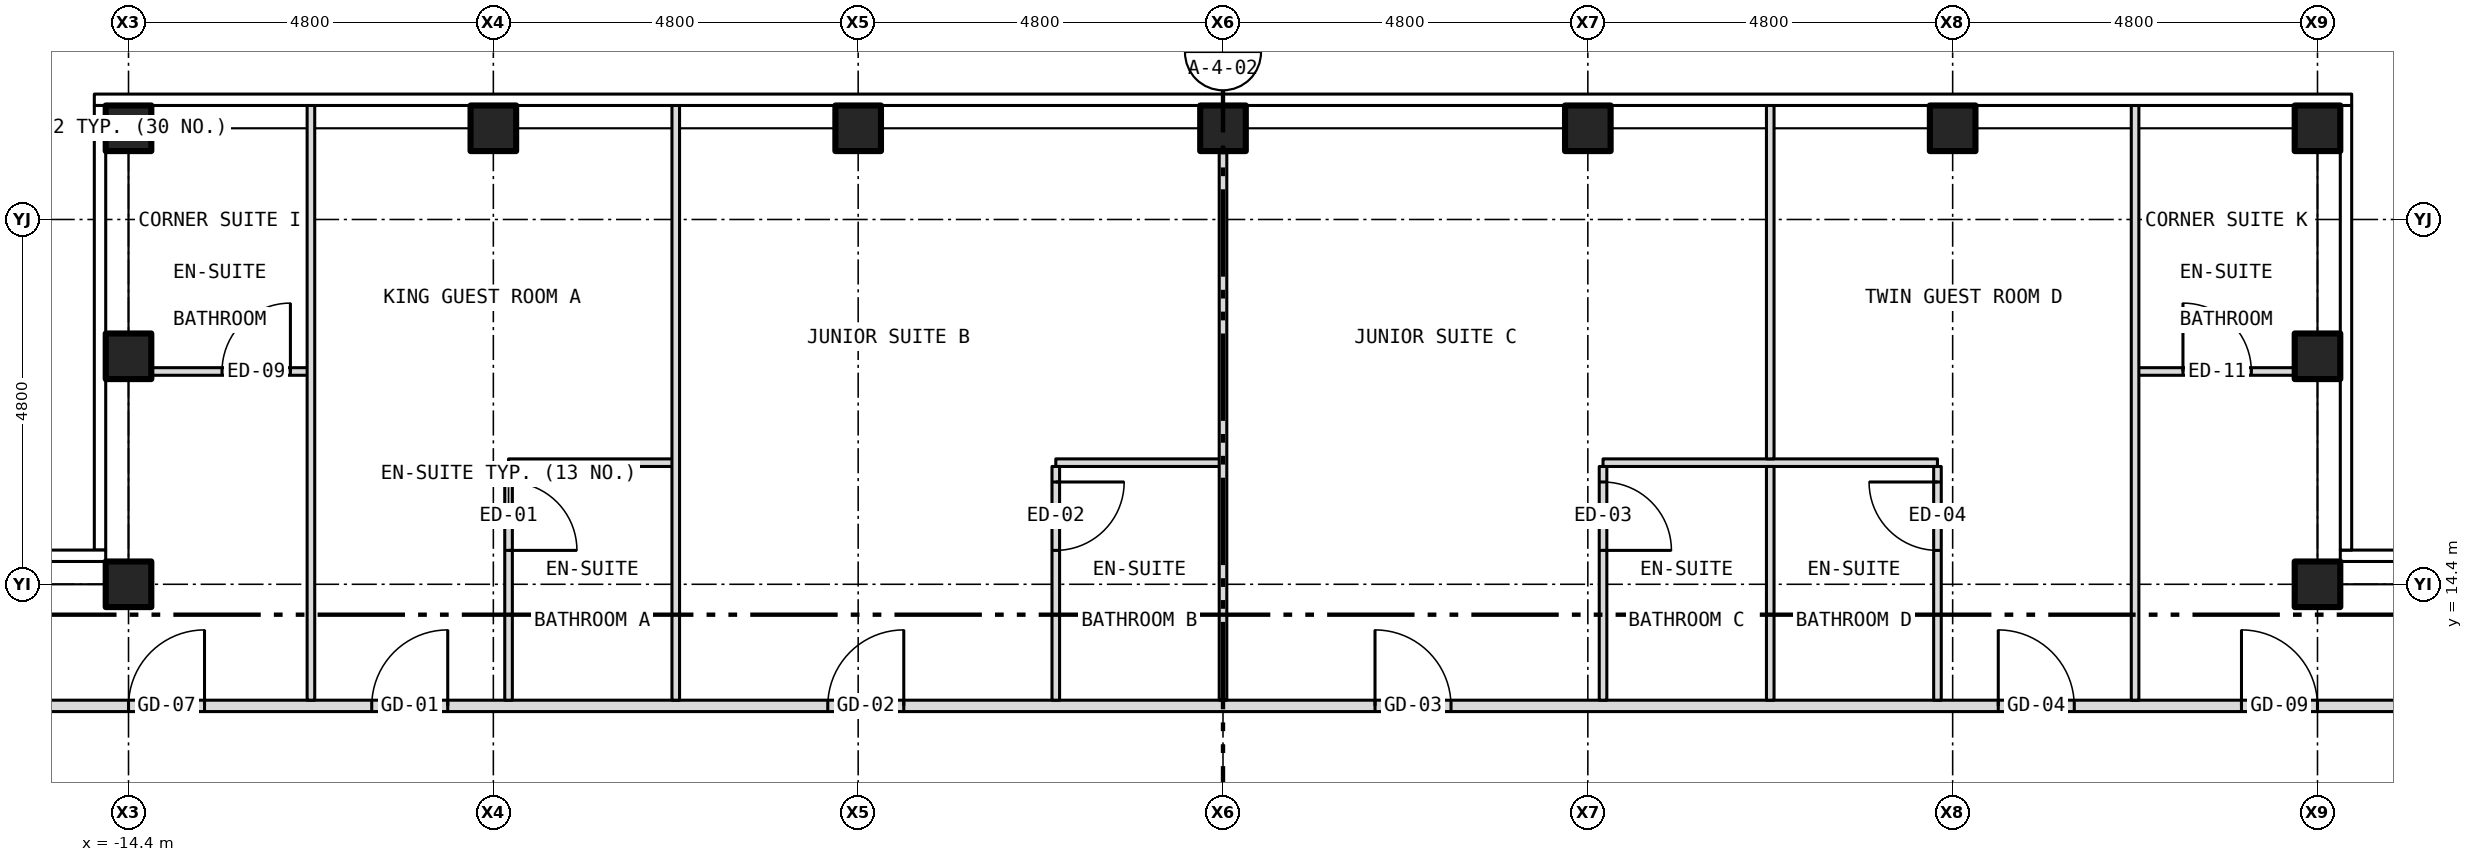
"""IFC4 building model, lengths in metres.
Left out: names, types, materials, properties, quantities, classifications, styles, units other than length and angle.
Written with IfcOpenShell. Run it as: python <this file> out.ifc"""

import sys

from ifc_helpers import new_model, si_unit, direction, frame, frame_2d, origin, origin_2d, place, context, subcontext, project, spatial, rectangle, hollow_rectangle, extrude, element, fill, save


model = new_model("IFC4")
c1 = context("Model", 3, precision=1e-05, world=origin(), true_north=direction((0.0, 1.0)))
c2 = subcontext(c1, "Body", "Model", "MODEL_VIEW")
j1 = project(units=[si_unit("LENGTHUNIT", "METRE"), si_unit("PLANEANGLEUNIT", "RADIAN")], contexts=[c1])
p1 = place(None, origin())
s1 = spatial("IfcSite", under=j1, at=p1, CompositionType="ELEMENT")
p2 = place(p1, origin())
s2 = spatial("IfcBuilding", under=s1, at=p2, CompositionType="ELEMENT")
p3 = place(p2, frame((0.0, 0.0, 262.0)))
s3 = spatial("IfcBuildingStorey", under=s2, at=p3, CompositionType="ELEMENT", Elevation=262.0)
for number, where, z_axis, x_axis in (
    (1, (-14.4, 20.4, -0.15), (0.0, 0.0, 1.0), (1.0, 0.0, 0.0)),
    (2, (-9.6, 20.4, -0.15), (0.0, 0.0, 1.0), (1.0, 0.0, 0.0)),
    (3, (-4.8, 20.4, -0.15), (0.0, 0.0, 1.0), (1.0, 0.0, 0.0)),
    (4, (0.0, 20.4, -0.15), (0.0, 0.0, 1.0), (1.0, 0.0, 0.0)),
    (5, (4.8, 20.4, -0.15), (0.0, 0.0, 1.0), (1.0, 0.0, 0.0)),
    (6, (9.6, 20.4, -0.15), (0.0, 0.0, 1.0), (1.0, 0.0, 0.0)),
    (7, (14.4, 20.4, -0.15), (0.0, 0.0, 1.0), (1.0, 0.0, 0.0)),
    (8, (-14.4, 14.4, -0.15), (0.0, 0.0, 1.0), (1.0, 0.0, 0.0)),
    (9, (-14.4, 17.4, -0.15), (0.0, 0.0, 1.0), (1.0, 0.0, 0.0)),
    (10, (14.4, 14.4, -0.15), (0.0, 0.0, 1.0), (1.0, 0.0, 0.0)),
    (11, (14.4, 17.4, -0.15), (0.0, 0.0, 1.0), (1.0, 0.0, 0.0)),
):
    element("IfcColumn", number, at=place(p3, frame(where, z_axis=z_axis, x_axis=x_axis)), inside=s3, PredefinedType="COLUMN", context=c2, shape_type="SweptSolid", body=[
        extrude(hollow_rectangle(XDim=0.6, YDim=0.6, WallThickness=0.03, at=origin_2d()), origin(), (0.0, 0.0, 1.0), 3.4),
    ])
p4 = place(p3, frame((-15.8, 12.8, 0.0), z_axis=(0.0, 0.0, 1.0), x_axis=(1.0, 0.0, 0.0)))
e12 = element("IfcWall", 12, at=p4, inside=s3, PredefinedType="PARTITIONING", context=c2, shape_type="SweptSolid", body=[
    extrude(rectangle(XDim=31.6, YDim=0.15, at=frame_2d((15.8, 0.0))), origin(), (0.0, 0.0, 1.0), 3.25),
])
p5 = place(p4, frame((4.6, 0.0, 0.0)))
e13 = element("IfcOpeningElement", 13, at=p5, cuts=e12, PredefinedType="OPENING", context=c2, shape_type="SweptSolid", body=[
    extrude(rectangle(XDim=1.0, YDim=2.1, at=frame_2d((0.5, 1.05))), frame((0.0, 0.087, 0.0), z_axis=(0.0, -1.0, 0.0), x_axis=(1.0, 0.0, 0.0)), (0.0, 0.0, 1.0), 0.174),
])
p6 = place(p4, frame((10.6, 0.0, 0.0)))
e14 = element("IfcOpeningElement", 14, at=p6, cuts=e12, PredefinedType="OPENING", context=c2, shape_type="SweptSolid", body=[
    extrude(rectangle(XDim=1.0, YDim=2.1, at=frame_2d((0.5, 1.05))), frame((0.0, 0.087, 0.0), z_axis=(0.0, -1.0, 0.0), x_axis=(1.0, 0.0, 0.0)), (0.0, 0.0, 1.0), 0.174),
])
p7 = place(p4, frame((17.8, 0.0, 0.0)))
e15 = element("IfcOpeningElement", 15, at=p7, cuts=e12, PredefinedType="OPENING", context=c2, shape_type="SweptSolid", body=[
    extrude(rectangle(XDim=1.0, YDim=2.1, at=frame_2d((0.5, 1.05))), frame((0.0, 0.087, 0.0), z_axis=(0.0, -1.0, 0.0), x_axis=(1.0, 0.0, 0.0)), (0.0, 0.0, 1.0), 0.174),
])
p8 = place(p4, frame((26.0, 0.0, 0.0)))
e16 = element("IfcOpeningElement", 16, at=p8, cuts=e12, PredefinedType="OPENING", context=c2, shape_type="SweptSolid", body=[
    extrude(rectangle(XDim=1.0, YDim=2.1, at=frame_2d((0.5, 1.05))), frame((0.0, 0.087, 0.0), z_axis=(0.0, -1.0, 0.0), x_axis=(1.0, 0.0, 0.0)), (0.0, 0.0, 1.0), 0.174),
])
p9 = place(p4, frame((1.4, 0.0, 0.0)))
e17 = element("IfcOpeningElement", 17, at=p9, cuts=e12, PredefinedType="OPENING", context=c2, shape_type="SweptSolid", body=[
    extrude(rectangle(XDim=1.0, YDim=2.1, at=frame_2d((0.5, 1.05))), frame((0.0, 0.087, 0.0), z_axis=(0.0, -1.0, 0.0), x_axis=(1.0, 0.0, 0.0)), (0.0, 0.0, 1.0), 0.174),
])
p10 = place(p4, frame((29.2, 0.0, 0.0)))
e18 = element("IfcOpeningElement", 18, at=p10, cuts=e12, PredefinedType="OPENING", context=c2, shape_type="SweptSolid", body=[
    extrude(rectangle(XDim=1.0, YDim=2.1, at=frame_2d((0.5, 1.05))), frame((0.0, 0.087, 0.0), z_axis=(0.0, -1.0, 0.0), x_axis=(1.0, 0.0, 0.0)), (0.0, 0.0, 1.0), 0.174),
])
for number, where, z_axis, x_axis in (
    (19, (-9.4, 16.0, 0.0), (0.0, 0.0, 1.0), (1.0, 0.0, 0.0)),
    (20, (-2.2, 16.0, 0.0), (0.0, 0.0, 1.0), (1.0, 0.0, 0.0)),
):
    element("IfcWall", number, at=place(p3, frame(where, z_axis=z_axis, x_axis=x_axis)), inside=s3, PredefinedType="PARTITIONING", context=c2, shape_type="SweptSolid", body=[
        extrude(rectangle(XDim=2.2, YDim=0.1, at=frame_2d((1.1, 0.0))), origin(), (0.0, 0.0, 1.0), 3.25),
    ])
p11 = place(p3, frame((5.0, 16.0, 0.0), z_axis=(0.0, 0.0, 1.0), x_axis=(1.0, 0.0, 0.0)))
e21 = element("IfcWall", 21, at=p11, inside=s3, PredefinedType="PARTITIONING", context=c2, shape_type="SweptSolid", body=[
    extrude(rectangle(XDim=4.4, YDim=0.1, at=frame_2d((2.2, 0.0))), origin(), (0.0, 0.0, 1.0), 3.25),
])
p12 = place(p3, frame((-14.28, 17.2, 0.0), z_axis=(0.0, 0.0, 1.0), x_axis=(1.0, 0.0, 0.0)))
e22 = element("IfcWall", 22, at=p12, inside=s3, PredefinedType="PARTITIONING", context=c2, shape_type="SweptSolid", body=[
    extrude(rectangle(XDim=2.28, YDim=0.1, at=frame_2d((1.14, 0.0))), origin(), (0.0, 0.0, 1.0), 3.25),
])
p13 = place(p12, frame((1.11, 0.0, 0.0)))
e23 = element("IfcOpeningElement", 23, at=p13, cuts=e22, PredefinedType="OPENING", context=c2, shape_type="SweptSolid", body=[
    extrude(rectangle(XDim=0.9, YDim=2.1, at=frame_2d((0.45, 1.05))), frame((0.0, 0.062, 0.0), z_axis=(0.0, -1.0, 0.0), x_axis=(1.0, 0.0, 0.0)), (0.0, 0.0, 1.0), 0.124),
])
p14 = place(p3, frame((12.0, 17.2, 0.0), z_axis=(0.0, 0.0, 1.0), x_axis=(1.0, 0.0, 0.0)))
e24 = element("IfcWall", 24, at=p14, inside=s3, PredefinedType="PARTITIONING", context=c2, shape_type="SweptSolid", body=[
    extrude(rectangle(XDim=2.28, YDim=0.1, at=frame_2d((1.14, 0.0))), origin(), (0.0, 0.0, 1.0), 3.25),
])
p15 = place(p14, frame((0.63, 0.0, 0.0)))
e25 = element("IfcOpeningElement", 25, at=p15, cuts=e24, PredefinedType="OPENING", context=c2, shape_type="SweptSolid", body=[
    extrude(rectangle(XDim=0.9, YDim=2.1, at=frame_2d((0.45, 1.05))), frame((0.0, 0.062, 0.0), z_axis=(0.0, -1.0, 0.0), x_axis=(1.0, 0.0, 0.0)), (0.0, 0.0, 1.0), 0.124),
])
p16 = place(p3, frame((-12.0, 12.875, 0.0), z_axis=(0.0, 0.0, 1.0), x_axis=(0.0, 1.0, 0.0)))
e26 = element("IfcWall", 26, at=p16, inside=s3, PredefinedType="PARTITIONING", context=c2, shape_type="SweptSolid", body=[
    extrude(rectangle(XDim=7.855, YDim=0.1, at=frame_2d((3.927, 0.0))), origin(), (0.0, 0.0, 1.0), 3.25),
])
p17 = place(p3, frame((-9.4, 12.875, 0.0), z_axis=(0.0, 0.0, 1.0), x_axis=(0.0, 1.0, 0.0)))
e27 = element("IfcWall", 27, at=p17, inside=s3, PredefinedType="PARTITIONING", context=c2, shape_type="SweptSolid", body=[
    extrude(rectangle(XDim=3.075, YDim=0.1, at=frame_2d((1.538, 0.0))), origin(), (0.0, 0.0, 1.0), 2.628),
])
p18 = place(p17, frame((1.971, 0.0, 0.0)))
e28 = element("IfcOpeningElement", 28, at=p18, cuts=e27, PredefinedType="OPENING", context=c2, shape_type="SweptSolid", body=[
    extrude(rectangle(XDim=0.9, YDim=2.1, at=frame_2d((0.45, 1.05))), frame((0.0, 0.062, 0.0), z_axis=(0.0, -1.0, 0.0), x_axis=(1.0, 0.0, 0.0)), (0.0, 0.0, 1.0), 0.124),
])
p19 = place(p3, frame((-7.2, 12.875, 0.0), z_axis=(0.0, 0.0, 1.0), x_axis=(0.0, 1.0, 0.0)))
e29 = element("IfcWall", 29, at=p19, inside=s3, PredefinedType="PARTITIONING", context=c2, shape_type="SweptSolid", body=[
    extrude(rectangle(XDim=7.855, YDim=0.1, at=frame_2d((3.927, 0.0))), origin(), (0.0, 0.0, 1.0), 3.25),
])
p20 = place(p3, frame((-2.2, 12.875, 0.0), z_axis=(0.0, 0.0, 1.0), x_axis=(0.0, 1.0, 0.0)))
e30 = element("IfcWall", 30, at=p20, inside=s3, PredefinedType="PARTITIONING", context=c2, shape_type="SweptSolid", body=[
    extrude(rectangle(XDim=3.075, YDim=0.1, at=frame_2d((1.538, 0.0))), origin(), (0.0, 0.0, 1.0), 3.25),
])
p21 = place(p20, frame((1.971, 0.0, 0.0)))
e31 = element("IfcOpeningElement", 31, at=p21, cuts=e30, PredefinedType="OPENING", context=c2, shape_type="SweptSolid", body=[
    extrude(rectangle(XDim=0.9, YDim=2.1, at=frame_2d((0.45, 1.05))), frame((0.0, 0.062, 0.0), z_axis=(0.0, -1.0, 0.0), x_axis=(1.0, 0.0, 0.0)), (0.0, 0.0, 1.0), 0.124),
])
p22 = place(p3, frame((0.0, 12.875, 0.0), z_axis=(0.0, 0.0, 1.0), x_axis=(0.0, 1.0, 0.0)))
e32 = element("IfcWall", 32, at=p22, inside=s3, PredefinedType="PARTITIONING", context=c2, shape_type="SweptSolid", body=[
    extrude(rectangle(XDim=7.405, YDim=0.1, at=frame_2d((3.703, 0.0))), origin(), (0.0, 0.0, 1.0), 2.16),
])
p23 = place(p3, frame((5.0, 12.875, 0.0), z_axis=(0.0, 0.0, 1.0), x_axis=(0.0, 1.0, 0.0)))
e33 = element("IfcWall", 33, at=p23, inside=s3, PredefinedType="PARTITIONING", context=c2, shape_type="SweptSolid", body=[
    extrude(rectangle(XDim=3.075, YDim=0.1, at=frame_2d((1.538, 0.0))), origin(), (0.0, 0.0, 1.0), 3.25),
])
p24 = place(p23, frame((1.971, 0.0, 0.0)))
e34 = element("IfcOpeningElement", 34, at=p24, cuts=e33, PredefinedType="OPENING", context=c2, shape_type="SweptSolid", body=[
    extrude(rectangle(XDim=0.9, YDim=2.1, at=frame_2d((0.45, 1.05))), frame((0.0, 0.062, 0.0), z_axis=(0.0, -1.0, 0.0), x_axis=(1.0, 0.0, 0.0)), (0.0, 0.0, 1.0), 0.124),
])
p25 = place(p3, frame((7.2, 12.875, 0.0), z_axis=(0.0, 0.0, 1.0), x_axis=(0.0, 1.0, 0.0)))
e35 = element("IfcWall", 35, at=p25, inside=s3, PredefinedType="PARTITIONING", context=c2, shape_type="SweptSolid", body=[
    extrude(rectangle(XDim=3.075, YDim=0.1, at=frame_2d((1.538, 0.0))), origin(), (0.0, 0.0, 1.0), 3.25),
])
p26 = place(p3, frame((7.2, 16.05, 0.0), z_axis=(0.0, 0.0, 1.0), x_axis=(0.0, 1.0, 0.0)))
e36 = element("IfcWall", 36, at=p26, inside=s3, PredefinedType="PARTITIONING", context=c2, shape_type="SweptSolid", body=[
    extrude(rectangle(XDim=4.68, YDim=0.1, at=frame_2d((2.34, 0.0))), origin(), (0.0, 0.0, 1.0), 3.25),
])
p27 = place(p3, frame((9.4, 12.875, 0.0), z_axis=(0.0, 0.0, 1.0), x_axis=(0.0, 1.0, 0.0)))
e37 = element("IfcWall", 37, at=p27, inside=s3, PredefinedType="PARTITIONING", context=c2, shape_type="SweptSolid", body=[
    extrude(rectangle(XDim=3.075, YDim=0.1, at=frame_2d((1.538, 0.0))), origin(), (0.0, 0.0, 1.0), 2.628),
])
p28 = place(p27, frame((1.971, 0.0, 0.0)))
e38 = element("IfcOpeningElement", 38, at=p28, cuts=e37, PredefinedType="OPENING", context=c2, shape_type="SweptSolid", body=[
    extrude(rectangle(XDim=0.9, YDim=2.1, at=frame_2d((0.45, 1.05))), frame((0.0, 0.062, 0.0), z_axis=(0.0, -1.0, 0.0), x_axis=(1.0, 0.0, 0.0)), (0.0, 0.0, 1.0), 0.124),
])
p29 = place(p3, frame((12.0, 12.875, 0.0), z_axis=(0.0, 0.0, 1.0), x_axis=(0.0, 1.0, 0.0)))
e39 = element("IfcWall", 39, at=p29, inside=s3, PredefinedType="PARTITIONING", context=c2, shape_type="SweptSolid", body=[
    extrude(rectangle(XDim=7.855, YDim=0.1, at=frame_2d((3.927, 0.0))), origin(), (0.0, 0.0, 1.0), 3.25),
])
p30 = place(p5, origin())
e40 = element("IfcDoor", 40, at=p30, inside=s3, OperationType="SINGLE_SWING_RIGHT", PredefinedType="DOOR", context=c2, shape_type="SweptSolid", body=[
    extrude(rectangle(XDim=1.0, YDim=2.1, at=frame_2d((0.5, 1.05))), frame((0.0, 0.025, 0.0), z_axis=(0.0, -1.0, 0.0), x_axis=(1.0, 0.0, 0.0)), (0.0, 0.0, 1.0), 0.05),
])
fill(e13, e40)
p31 = place(p18, origin())
e41 = element("IfcDoor", 41, at=p31, inside=s3, OperationType="SINGLE_SWING_LEFT", PredefinedType="DOOR", context=c2, shape_type="SweptSolid", body=[
    extrude(rectangle(XDim=0.9, YDim=2.1, at=frame_2d((0.45, 1.05))), frame((0.0, 0.025, 0.0), z_axis=(0.0, -1.0, 0.0), x_axis=(1.0, 0.0, 0.0)), (0.0, 0.0, 1.0), 0.05),
])
fill(e28, e41)
p32 = place(p6, origin())
e42 = element("IfcDoor", 42, at=p32, inside=s3, OperationType="SINGLE_SWING_RIGHT", PredefinedType="DOOR", context=c2, shape_type="SweptSolid", body=[
    extrude(rectangle(XDim=1.0, YDim=2.1, at=frame_2d((0.5, 1.05))), frame((0.0, 0.025, 0.0), z_axis=(0.0, -1.0, 0.0), x_axis=(1.0, 0.0, 0.0)), (0.0, 0.0, 1.0), 0.05),
])
fill(e14, e42)
p33 = place(p21, origin())
e43 = element("IfcDoor", 43, at=p33, inside=s3, OperationType="SINGLE_SWING_RIGHT", PredefinedType="DOOR", context=c2, shape_type="SweptSolid", body=[
    extrude(rectangle(XDim=0.9, YDim=2.1, at=frame_2d((0.45, 1.05))), frame((0.0, 0.025, 0.0), z_axis=(0.0, -1.0, 0.0), x_axis=(1.0, 0.0, 0.0)), (0.0, 0.0, 1.0), 0.05),
])
fill(e31, e43)
p34 = place(p7, origin())
e44 = element("IfcDoor", 44, at=p34, inside=s3, OperationType="SINGLE_SWING_LEFT", PredefinedType="DOOR", context=c2, shape_type="SweptSolid", body=[
    extrude(rectangle(XDim=1.0, YDim=2.1, at=frame_2d((0.5, 1.05))), frame((0.0, 0.025, 0.0), z_axis=(0.0, -1.0, 0.0), x_axis=(1.0, 0.0, 0.0)), (0.0, 0.0, 1.0), 0.05),
])
fill(e15, e44)
p35 = place(p24, origin())
e45 = element("IfcDoor", 45, at=p35, inside=s3, OperationType="SINGLE_SWING_LEFT", PredefinedType="DOOR", context=c2, shape_type="SweptSolid", body=[
    extrude(rectangle(XDim=0.9, YDim=2.1, at=frame_2d((0.45, 1.05))), frame((0.0, 0.025, 0.0), z_axis=(0.0, -1.0, 0.0), x_axis=(1.0, 0.0, 0.0)), (0.0, 0.0, 1.0), 0.05),
])
fill(e34, e45)
p36 = place(p8, origin())
e46 = element("IfcDoor", 46, at=p36, inside=s3, OperationType="SINGLE_SWING_LEFT", PredefinedType="DOOR", context=c2, shape_type="SweptSolid", body=[
    extrude(rectangle(XDim=1.0, YDim=2.1, at=frame_2d((0.5, 1.05))), frame((0.0, 0.025, 0.0), z_axis=(0.0, -1.0, 0.0), x_axis=(1.0, 0.0, 0.0)), (0.0, 0.0, 1.0), 0.05),
])
fill(e16, e46)
p37 = place(p28, origin())
e47 = element("IfcDoor", 47, at=p37, inside=s3, OperationType="SINGLE_SWING_RIGHT", PredefinedType="DOOR", context=c2, shape_type="SweptSolid", body=[
    extrude(rectangle(XDim=0.9, YDim=2.1, at=frame_2d((0.45, 1.05))), frame((0.0, 0.025, 0.0), z_axis=(0.0, -1.0, 0.0), x_axis=(1.0, 0.0, 0.0)), (0.0, 0.0, 1.0), 0.05),
])
fill(e38, e47)
p38 = place(p13, origin())
e48 = element("IfcDoor", 48, at=p38, inside=s3, OperationType="SINGLE_SWING_RIGHT", PredefinedType="DOOR", context=c2, shape_type="SweptSolid", body=[
    extrude(rectangle(XDim=0.9, YDim=2.1, at=frame_2d((0.45, 1.05))), frame((0.0, 0.025, 0.0), z_axis=(0.0, -1.0, 0.0), x_axis=(1.0, 0.0, 0.0)), (0.0, 0.0, 1.0), 0.05),
])
fill(e23, e48)
p39 = place(p9, origin())
e49 = element("IfcDoor", 49, at=p39, inside=s3, OperationType="SINGLE_SWING_RIGHT", PredefinedType="DOOR", context=c2, shape_type="SweptSolid", body=[
    extrude(rectangle(XDim=1.0, YDim=2.1, at=frame_2d((0.5, 1.05))), frame((0.0, 0.025, 0.0), z_axis=(0.0, -1.0, 0.0), x_axis=(1.0, 0.0, 0.0)), (0.0, 0.0, 1.0), 0.05),
])
fill(e17, e49)
p40 = place(p15, origin())
e50 = element("IfcDoor", 50, at=p40, inside=s3, OperationType="SINGLE_SWING_LEFT", PredefinedType="DOOR", context=c2, shape_type="SweptSolid", body=[
    extrude(rectangle(XDim=0.9, YDim=2.1, at=frame_2d((0.45, 1.05))), frame((0.0, 0.025, 0.0), z_axis=(0.0, -1.0, 0.0), x_axis=(1.0, 0.0, 0.0)), (0.0, 0.0, 1.0), 0.05),
])
fill(e25, e50)
p41 = place(p10, origin())
e51 = element("IfcDoor", 51, at=p41, inside=s3, OperationType="SINGLE_SWING_LEFT", PredefinedType="DOOR", context=c2, shape_type="SweptSolid", body=[
    extrude(rectangle(XDim=1.0, YDim=2.1, at=frame_2d((0.5, 1.05))), frame((0.0, 0.025, 0.0), z_axis=(0.0, -1.0, 0.0), x_axis=(1.0, 0.0, 0.0)), (0.0, 0.0, 1.0), 0.05),
])
fill(e18, e51)
save(model, sys.argv[1])
